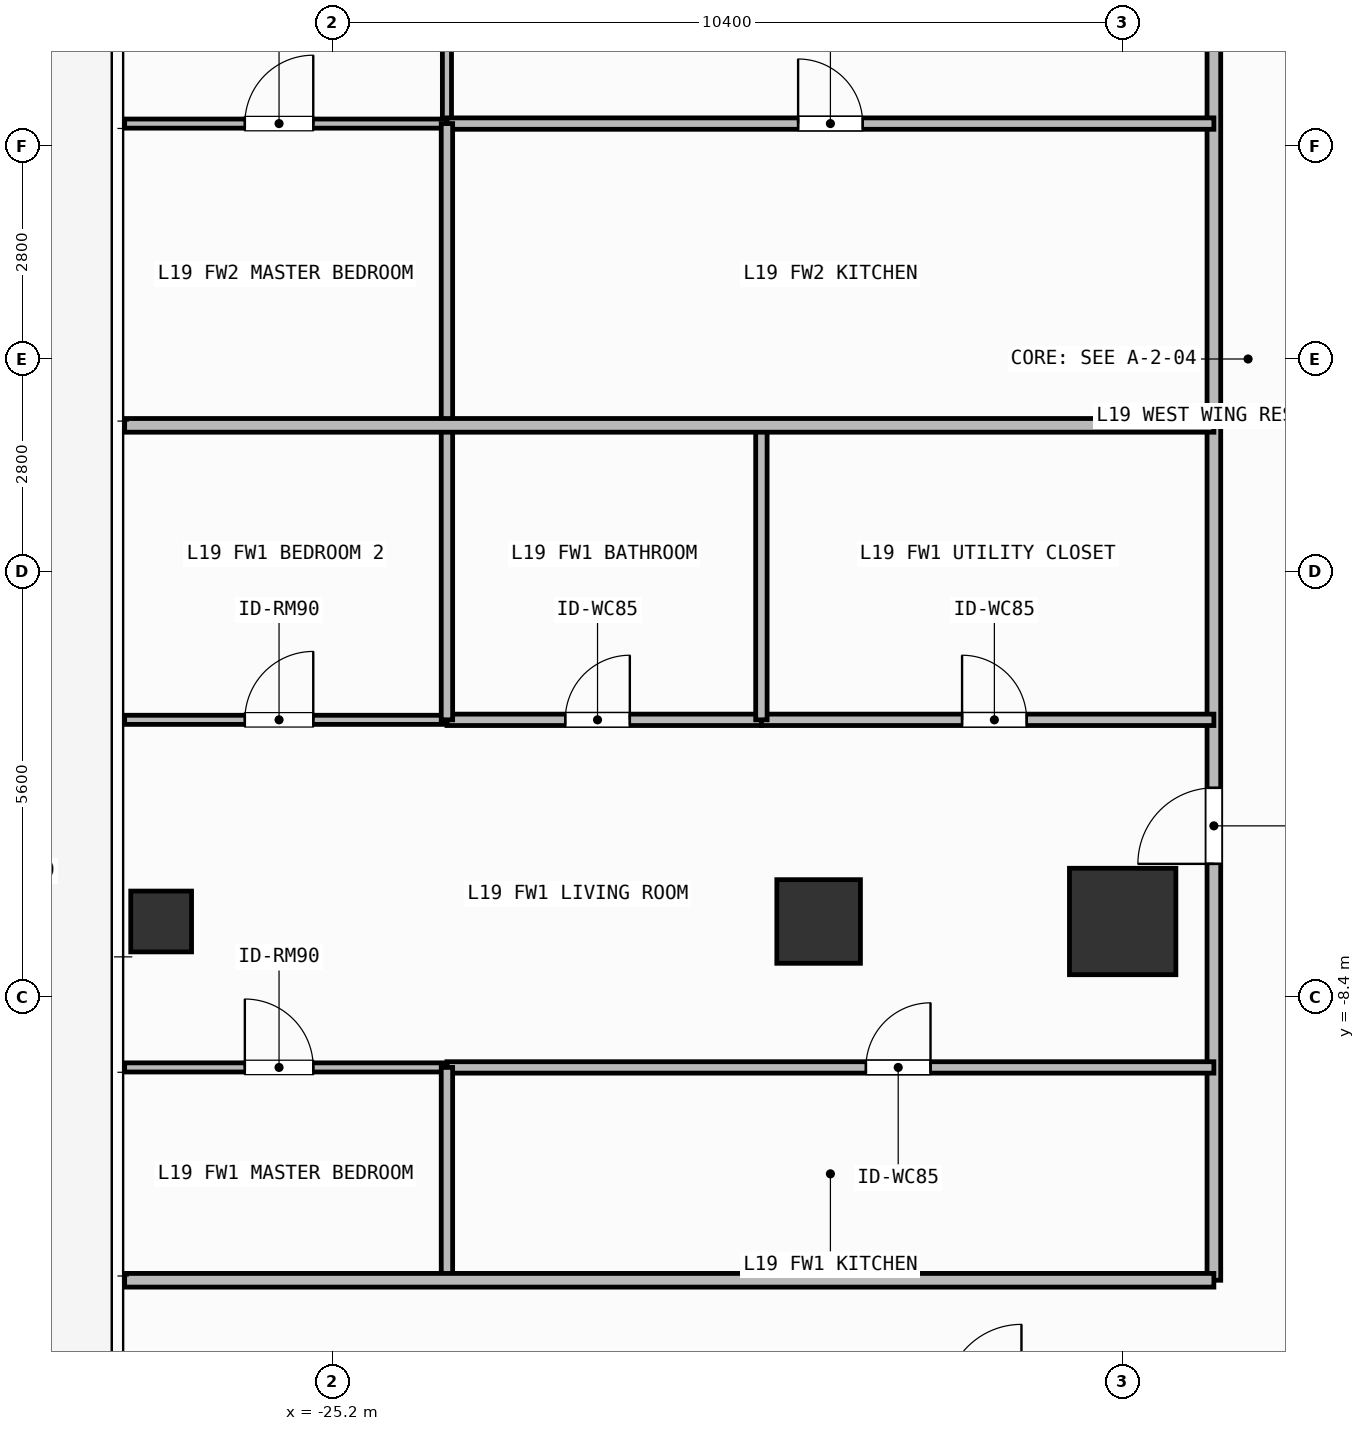
"""IFC4 building model, lengths in metres.
Left out: names, types, materials, properties, quantities, classifications, styles, units other than length and angle.
Written with IfcOpenShell. Run it as: python <this file> out.ifc"""

import sys

from ifc_helpers import new_model, si_unit, direction, frame, frame_2d, origin, origin_2d, place, context, subcontext, project, spatial, rectangle, hollow_rectangle, extrude, element, fill, save


model = new_model("IFC4")
c1 = context("Model", 3, precision=1e-05, world=origin(), true_north=direction((0.0, 1.0)))
c2 = subcontext(c1, "Body", "Model", "MODEL_VIEW")
j1 = project(units=[si_unit("LENGTHUNIT", "METRE"), si_unit("PLANEANGLEUNIT", "RADIAN")], contexts=[c1])
p1 = place(None, origin())
s1 = spatial("IfcSite", under=j1, at=p1, CompositionType="ELEMENT")
p2 = place(p1, origin())
s2 = spatial("IfcBuilding", under=s1, at=p2, CompositionType="ELEMENT")
p3 = place(p2, frame((0.0, 0.0, 73.5)))
s3 = spatial("IfcBuildingStorey", under=s2, at=p3, CompositionType="ELEMENT", Elevation=73.5)
p4 = place(p3, frame((-14.8, -7.4, 0.0), z_axis=(0.0, 0.0, 1.0), x_axis=(1.0, 0.0, 0.0)))
e1 = element("IfcColumn", 1, at=p4, inside=s3, PredefinedType="COLUMN", context=c2, shape_type="SweptSolid", body=[
    extrude(rectangle(XDim=1.4, YDim=1.4, at=origin_2d()), origin(), (0.0, 0.0, 1.0), 3.9),
])
p5 = place(p3, frame((-18.8, -7.4, 0.0), z_axis=(0.0, 0.0, 1.0), x_axis=(1.0, 0.0, 0.0)))
e2 = element("IfcColumn", 2, at=p5, inside=s3, PredefinedType="COLUMN", context=c2, shape_type="SweptSolid", body=[
    extrude(rectangle(XDim=1.1, YDim=1.1, at=origin_2d()), origin(), (0.0, 0.0, 1.0), 3.9),
])
p6 = place(p3, frame((-27.45, -7.4, 0.0), z_axis=(0.0, 0.0, 1.0), x_axis=(1.0, 0.0, 0.0)))
e3 = element("IfcColumn", 3, at=p6, inside=s3, PredefinedType="COLUMN", context=c2, shape_type="SweptSolid", body=[
    extrude(hollow_rectangle(XDim=0.8, YDim=0.8, WallThickness=0.036, at=origin_2d()), origin(), (0.0, 0.0, 1.0), 3.9),
])
p7 = place(p3, frame((-13.6, -12.12, 0.0), z_axis=(0.0, 0.0, 1.0), x_axis=(0.0, 1.0, 0.0)))
e4 = element("IfcWall", 4, at=p7, inside=s3, PredefinedType="PARTITIONING", context=c2, shape_type="SweptSolid", body=[
    extrude(rectangle(XDim=11.247, YDim=0.18, at=frame_2d((5.624, 0.0))), origin(), (0.0, 0.0, 1.0), 3.6),
])
p8 = place(p7, frame((5.478, 0.0, 0.0)))
e5 = element("IfcOpeningElement", 5, at=p8, cuts=e4, PredefinedType="OPENING", context=c2, shape_type="SweptSolid", body=[
    extrude(rectangle(XDim=1.0, YDim=2.2, at=frame_2d((0.5, 1.1))), frame((0.0, 0.1, 0.0), z_axis=(0.0, -1.0, 0.0), x_axis=(1.0, 0.0, 0.0)), (0.0, 0.0, 1.0), 0.2),
])
p9 = place(p3, frame((-23.69, -4.747, 0.0), z_axis=(0.0, 0.0, 1.0), x_axis=(1.0, 0.0, 0.0)))
e6 = element("IfcWall", 6, at=p9, inside=s3, PredefinedType="PARTITIONING", context=c2, shape_type="SweptSolid", body=[
    extrude(rectangle(XDim=4.137, YDim=0.15, at=frame_2d((2.068, 0.0))), origin(), (0.0, 0.0, 1.0), 3.6),
])
p10 = place(p9, frame((1.556, 0.0, 0.0)))
e7 = element("IfcOpeningElement", 7, at=p10, cuts=e6, PredefinedType="OPENING", context=c2, shape_type="SweptSolid", body=[
    extrude(rectangle(XDim=0.85, YDim=2.1, at=frame_2d((0.425, 1.05))), frame((0.0, 0.085, 0.0), z_axis=(0.0, -1.0, 0.0), x_axis=(1.0, 0.0, 0.0)), (0.0, 0.0, 1.0), 0.17),
])
p11 = place(p3, frame((-19.553, -4.747, 0.0), z_axis=(0.0, 0.0, 1.0), x_axis=(1.0, 0.0, 0.0)))
e8 = element("IfcWall", 8, at=p11, inside=s3, PredefinedType="PARTITIONING", context=c2, shape_type="SweptSolid", body=[
    extrude(rectangle(XDim=5.953, YDim=0.15, at=frame_2d((2.977, 0.0))), origin(), (0.0, 0.0, 1.0), 3.6),
])
p12 = place(p11, frame((2.64, 0.0, 0.0)))
e9 = element("IfcOpeningElement", 9, at=p12, cuts=e8, PredefinedType="OPENING", context=c2, shape_type="SweptSolid", body=[
    extrude(rectangle(XDim=0.85, YDim=2.1, at=frame_2d((0.425, 1.05))), frame((0.0, 0.085, 0.0), z_axis=(0.0, -1.0, 0.0), x_axis=(1.0, 0.0, 0.0)), (0.0, 0.0, 1.0), 0.17),
])
p13 = place(p3, frame((-23.69, -9.32, 0.0), z_axis=(0.0, 0.0, 1.0), x_axis=(1.0, 0.0, 0.0)))
e10 = element("IfcWall", 10, at=p13, inside=s3, PredefinedType="PARTITIONING", context=c2, shape_type="SweptSolid", body=[
    extrude(rectangle(XDim=10.09, YDim=0.15, at=frame_2d((5.045, 0.0))), origin(), (0.0, 0.0, 1.0), 3.6),
])
p14 = place(p13, frame((5.512, 0.0, 0.0)))
e11 = element("IfcOpeningElement", 11, at=p14, cuts=e10, PredefinedType="OPENING", context=c2, shape_type="SweptSolid", body=[
    extrude(rectangle(XDim=0.85, YDim=2.1, at=frame_2d((0.425, 1.05))), frame((0.0, 0.085, 0.0), z_axis=(0.0, -1.0, 0.0), x_axis=(1.0, 0.0, 0.0)), (0.0, 0.0, 1.0), 0.17),
])
p15 = place(p3, frame((-27.93, -9.32, 0.0), z_axis=(0.0, 0.0, 1.0), x_axis=(1.0, 0.0, 0.0)))
e12 = element("IfcWall", 12, at=p15, inside=s3, PredefinedType="PARTITIONING", context=c2, shape_type="SweptSolid", body=[
    extrude(rectangle(XDim=4.24, YDim=0.12, at=frame_2d((2.12, 0.0))), origin(), (0.0, 0.0, 1.0), 3.6),
])
p16 = place(p15, frame((1.581, 0.0, 0.0)))
e13 = element("IfcOpeningElement", 13, at=p16, cuts=e12, PredefinedType="OPENING", context=c2, shape_type="SweptSolid", body=[
    extrude(rectangle(XDim=0.9, YDim=2.1, at=frame_2d((0.45, 1.05))), frame((0.0, 0.07, 0.0), z_axis=(0.0, -1.0, 0.0), x_axis=(1.0, 0.0, 0.0)), (0.0, 0.0, 1.0), 0.14),
])
p17 = place(p3, frame((-27.93, -4.747, 0.0), z_axis=(0.0, 0.0, 1.0), x_axis=(1.0, 0.0, 0.0)))
e14 = element("IfcWall", 14, at=p17, inside=s3, PredefinedType="PARTITIONING", context=c2, shape_type="SweptSolid", body=[
    extrude(rectangle(XDim=4.24, YDim=0.12, at=frame_2d((2.12, 0.0))), origin(), (0.0, 0.0, 1.0), 3.6),
])
p18 = place(p17, frame((1.581, 0.0, 0.0)))
e15 = element("IfcOpeningElement", 15, at=p18, cuts=e14, PredefinedType="OPENING", context=c2, shape_type="SweptSolid", body=[
    extrude(rectangle(XDim=0.9, YDim=2.1, at=frame_2d((0.45, 1.05))), frame((0.0, 0.07, 0.0), z_axis=(0.0, -1.0, 0.0), x_axis=(1.0, 0.0, 0.0)), (0.0, 0.0, 1.0), 0.14),
])
p19 = place(p3, frame((-13.6, -0.873, 0.0), z_axis=(0.0, 0.0, 1.0), x_axis=(0.0, 1.0, 0.0)))
e16 = element("IfcWall", 16, at=p19, inside=s3, PredefinedType="PARTITIONING", context=c2, shape_type="SweptSolid", body=[
    extrude(rectangle(XDim=12.993, YDim=0.18, at=frame_2d((6.497, 0.0))), origin(), (0.0, 0.0, 1.0), 3.6),
])
p20 = place(p19, frame((6.446, 0.0, 0.0)))
e17 = element("IfcOpeningElement", 17, at=p20, cuts=e16, PredefinedType="OPENING", context=c2, shape_type="SweptSolid", body=[
    extrude(rectangle(XDim=1.0, YDim=2.2, at=frame_2d((0.5, 1.1))), frame((0.0, 0.1, 0.0), z_axis=(0.0, -1.0, 0.0), x_axis=(1.0, 0.0, 0.0)), (0.0, 0.0, 1.0), 0.2),
])
p21 = place(p3, frame((-23.69, 3.097, 0.0), z_axis=(0.0, 0.0, 1.0), x_axis=(0.0, 1.0, 0.0)))
e18 = element("IfcWall", 18, at=p21, inside=s3, PredefinedType="PARTITIONING", context=c2, shape_type="SweptSolid", body=[
    extrude(rectangle(XDim=6.223, YDim=0.12, at=frame_2d((3.112, 0.0))), origin(), (0.0, 0.0, 1.0), 3.6),
])
p22 = place(p21, frame((2.662, 0.0, 0.0)))
e19 = element("IfcOpeningElement", 19, at=p22, cuts=e18, PredefinedType="OPENING", context=c2, shape_type="SweptSolid", body=[
    extrude(rectangle(XDim=0.9, YDim=2.1, at=frame_2d((0.45, 1.05))), frame((0.0, 0.07, 0.0), z_axis=(0.0, -1.0, 0.0), x_axis=(1.0, 0.0, 0.0)), (0.0, 0.0, 1.0), 0.14),
])
p23 = place(p3, frame((-23.69, 3.097, 0.0), z_axis=(0.0, 0.0, 1.0), x_axis=(1.0, 0.0, 0.0)))
e20 = element("IfcWall", 20, at=p23, inside=s3, PredefinedType="PARTITIONING", context=c2, shape_type="SweptSolid", body=[
    extrude(rectangle(XDim=10.09, YDim=0.15, at=frame_2d((5.045, 0.0))), origin(), (0.0, 0.0, 1.0), 3.6),
])
p24 = place(p23, frame((4.62, 0.0, 0.0)))
e21 = element("IfcOpeningElement", 21, at=p24, cuts=e20, PredefinedType="OPENING", context=c2, shape_type="SweptSolid", body=[
    extrude(rectangle(XDim=0.85, YDim=2.1, at=frame_2d((0.425, 1.05))), frame((0.0, 0.085, 0.0), z_axis=(0.0, -1.0, 0.0), x_axis=(1.0, 0.0, 0.0)), (0.0, 0.0, 1.0), 0.17),
])
p25 = place(p3, frame((-27.93, 3.097, 0.0), z_axis=(0.0, 0.0, 1.0), x_axis=(1.0, 0.0, 0.0)))
e22 = element("IfcWall", 22, at=p25, inside=s3, PredefinedType="PARTITIONING", context=c2, shape_type="SweptSolid", body=[
    extrude(rectangle(XDim=4.24, YDim=0.12, at=frame_2d((2.12, 0.0))), origin(), (0.0, 0.0, 1.0), 3.6),
])
p26 = place(p25, frame((1.581, 0.0, 0.0)))
e23 = element("IfcOpeningElement", 23, at=p26, cuts=e22, PredefinedType="OPENING", context=c2, shape_type="SweptSolid", body=[
    extrude(rectangle(XDim=0.9, YDim=2.1, at=frame_2d((0.45, 1.05))), frame((0.0, 0.07, 0.0), z_axis=(0.0, -1.0, 0.0), x_axis=(1.0, 0.0, 0.0)), (0.0, 0.0, 1.0), 0.14),
])
p27 = place(p3, frame((-19.553, -4.747, 0.0), z_axis=(0.0, 0.0, 1.0), x_axis=(0.0, 1.0, 0.0)))
e24 = element("IfcWall", 24, at=p27, inside=s3, PredefinedType="PARTITIONING", context=c2, shape_type="SweptSolid", body=[
    extrude(rectangle(XDim=3.874, YDim=0.15, at=frame_2d((1.937, 0.0))), origin(), (0.0, 0.0, 1.0), 3.6),
])
p28 = place(p3, frame((-23.69, -12.12, 0.0), z_axis=(0.0, 0.0, 1.0), x_axis=(0.0, 1.0, 0.0)))
e25 = element("IfcWall", 25, at=p28, inside=s3, PredefinedType="PARTITIONING", context=c2, shape_type="SweptSolid", body=[
    extrude(rectangle(XDim=2.8, YDim=0.15, at=frame_2d((1.4, 0.0))), origin(), (0.0, 0.0, 1.0), 3.6),
])
p29 = place(p3, frame((-23.69, -4.747, 0.0), z_axis=(0.0, 0.0, 1.0), x_axis=(0.0, 1.0, 0.0)))
e26 = element("IfcWall", 26, at=p29, inside=s3, PredefinedType="PARTITIONING", context=c2, shape_type="SweptSolid", body=[
    extrude(rectangle(XDim=3.874, YDim=0.15, at=frame_2d((1.937, 0.0))), origin(), (0.0, 0.0, 1.0), 3.6),
])
p30 = place(p3, frame((-23.69, -0.873, 0.0), z_axis=(0.0, 0.0, 1.0), x_axis=(0.0, 1.0, 0.0)))
e27 = element("IfcWall", 27, at=p30, inside=s3, PredefinedType="PARTITIONING", context=c2, shape_type="SweptSolid", body=[
    extrude(rectangle(XDim=3.97, YDim=0.15, at=frame_2d((1.985, 0.0))), origin(), (0.0, 0.0, 1.0), 3.6),
])
for number, where, z_axis, x_axis in (
    (28, (-27.93, -0.873, 0.0), (0.0, 0.0, 1.0), (1.0, 0.0, 0.0)),
    (29, (-27.93, -12.12, 0.0), (0.0, 0.0, 1.0), (1.0, 0.0, 0.0)),
):
    element("IfcWall", number, at=place(p3, frame(where, z_axis=z_axis, x_axis=x_axis)), inside=s3, PredefinedType="PARTITIONING", context=c2, shape_type="SweptSolid", body=[
        extrude(rectangle(XDim=14.33, YDim=0.18, at=frame_2d((7.165, 0.0))), origin(), (0.0, 0.0, 1.0), 3.6),
    ])
p31 = place(p8, origin())
e30 = element("IfcDoor", 30, at=p31, inside=s3, OperationType="SINGLE_SWING_LEFT", PredefinedType="DOOR", context=c2, shape_type="SweptSolid", body=[
    extrude(rectangle(XDim=1.0, YDim=2.2, at=frame_2d((0.5, 1.1))), frame((0.0, 0.025, 0.0), z_axis=(0.0, -1.0, 0.0), x_axis=(1.0, 0.0, 0.0)), (0.0, 0.0, 1.0), 0.05),
])
fill(e5, e30)
p32 = place(p10, origin())
e31 = element("IfcDoor", 31, at=p32, inside=s3, OperationType="SINGLE_SWING_RIGHT", PredefinedType="DOOR", context=c2, shape_type="SweptSolid", body=[
    extrude(rectangle(XDim=0.85, YDim=2.1, at=frame_2d((0.425, 1.05))), frame((0.0, 0.025, 0.0), z_axis=(0.0, -1.0, 0.0), x_axis=(1.0, 0.0, 0.0)), (0.0, 0.0, 1.0), 0.05),
])
fill(e7, e31)
p33 = place(p12, origin())
e32 = element("IfcDoor", 32, at=p33, inside=s3, OperationType="SINGLE_SWING_LEFT", PredefinedType="DOOR", context=c2, shape_type="SweptSolid", body=[
    extrude(rectangle(XDim=0.85, YDim=2.1, at=frame_2d((0.425, 1.05))), frame((0.0, 0.025, 0.0), z_axis=(0.0, -1.0, 0.0), x_axis=(1.0, 0.0, 0.0)), (0.0, 0.0, 1.0), 0.05),
])
fill(e9, e32)
p34 = place(p14, origin())
e33 = element("IfcDoor", 33, at=p34, inside=s3, OperationType="SINGLE_SWING_RIGHT", PredefinedType="DOOR", context=c2, shape_type="SweptSolid", body=[
    extrude(rectangle(XDim=0.85, YDim=2.1, at=frame_2d((0.425, 1.05))), frame((0.0, 0.025, 0.0), z_axis=(0.0, -1.0, 0.0), x_axis=(1.0, 0.0, 0.0)), (0.0, 0.0, 1.0), 0.05),
])
fill(e11, e33)
p35 = place(p16, origin())
e34 = element("IfcDoor", 34, at=p35, inside=s3, OperationType="SINGLE_SWING_LEFT", PredefinedType="DOOR", context=c2, shape_type="SweptSolid", body=[
    extrude(rectangle(XDim=0.9, YDim=2.1, at=frame_2d((0.45, 1.05))), frame((0.0, 0.025, 0.0), z_axis=(0.0, -1.0, 0.0), x_axis=(1.0, 0.0, 0.0)), (0.0, 0.0, 1.0), 0.05),
])
fill(e13, e34)
p36 = place(p18, origin())
e35 = element("IfcDoor", 35, at=p36, inside=s3, OperationType="SINGLE_SWING_RIGHT", PredefinedType="DOOR", context=c2, shape_type="SweptSolid", body=[
    extrude(rectangle(XDim=0.9, YDim=2.1, at=frame_2d((0.45, 1.05))), frame((0.0, 0.025, 0.0), z_axis=(0.0, -1.0, 0.0), x_axis=(1.0, 0.0, 0.0)), (0.0, 0.0, 1.0), 0.05),
])
fill(e15, e35)
p37 = place(p24, origin())
e36 = element("IfcDoor", 36, at=p37, inside=s3, OperationType="SINGLE_SWING_LEFT", PredefinedType="DOOR", context=c2, shape_type="SweptSolid", body=[
    extrude(rectangle(XDim=0.85, YDim=2.1, at=frame_2d((0.425, 1.05))), frame((0.0, 0.025, 0.0), z_axis=(0.0, -1.0, 0.0), x_axis=(1.0, 0.0, 0.0)), (0.0, 0.0, 1.0), 0.05),
])
fill(e21, e36)
p38 = place(p26, origin())
e37 = element("IfcDoor", 37, at=p38, inside=s3, OperationType="SINGLE_SWING_RIGHT", PredefinedType="DOOR", context=c2, shape_type="SweptSolid", body=[
    extrude(rectangle(XDim=0.9, YDim=2.1, at=frame_2d((0.45, 1.05))), frame((0.0, 0.025, 0.0), z_axis=(0.0, -1.0, 0.0), x_axis=(1.0, 0.0, 0.0)), (0.0, 0.0, 1.0), 0.05),
])
fill(e23, e37)
save(model, sys.argv[1])
